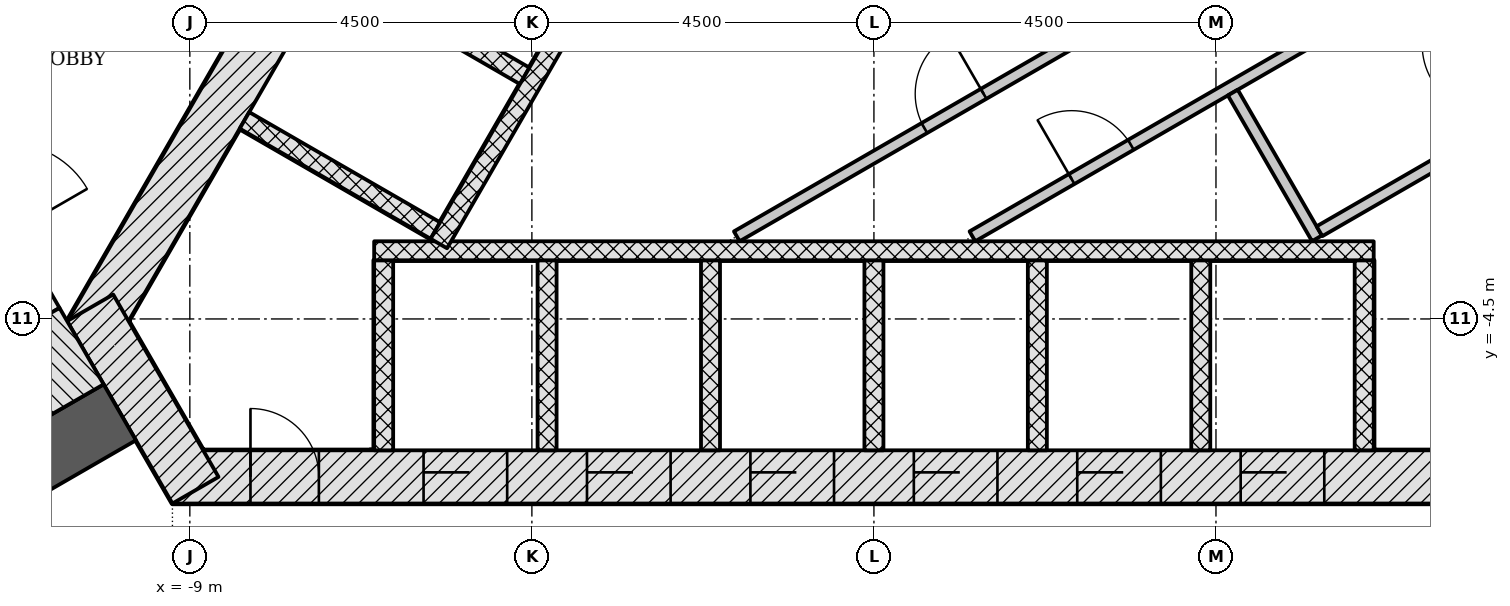
"""IFC4 building model, lengths in metres.
Left out: names, types, materials, properties, quantities, classifications, styles, units other than length and angle.
Written with IfcOpenShell. Run it as: python <this file> out.ifc"""

import sys

from ifc_helpers import new_model, si_unit, direction, frame, frame_2d, origin, place, context, subcontext, project, spatial, rectangle, extrude, element, fill, save


model = new_model("IFC4")
c1 = context("Model", 3, precision=1e-05, world=origin(), true_north=direction((0.0, 1.0)))
c2 = subcontext(c1, "Body", "Model", "MODEL_VIEW")
j1 = project(units=[si_unit("LENGTHUNIT", "METRE"), si_unit("PLANEANGLEUNIT", "RADIAN")], contexts=[c1])
p1 = place(None, origin())
s1 = spatial("IfcSite", under=j1, at=p1, CompositionType="ELEMENT")
p2 = place(p1, origin())
s2 = spatial("IfcBuilding", under=s1, at=p2, CompositionType="ELEMENT")
p3 = place(p2, frame((0.0, 0.0, 79.8)))
s3 = spatial("IfcBuildingStorey", under=s2, at=p3, CompositionType="ELEMENT", Elevation=79.8)
p4 = place(p3, frame((-9.229, -6.578, -0.2), z_axis=(0.0, 0.0, 1.0), x_axis=(1.0, 0.0, 0.0)))
e1 = element("IfcWall", 1, at=p4, inside=s3, PredefinedType="SHEAR", context=c2, shape_type="SweptSolid", body=[
    extrude(rectangle(XDim=18.458, YDim=0.7, at=frame_2d((9.229, 0.0))), origin(), (0.0, 0.0, 1.0), 3.6),
])
p5 = place(p4, frame((3.304, 0.0, 0.2)))
e2 = element("IfcOpeningElement", 2, at=p5, cuts=e1, PredefinedType="OPENING", context=c2, shape_type="SweptSolid", body=[
    extrude(rectangle(XDim=1.1, YDim=2.1, at=frame_2d((0.55, 1.05))), frame((0.0, 0.36, 0.0), z_axis=(0.0, -1.0, 0.0), x_axis=(1.0, 0.0, 0.0)), (0.0, 0.0, 1.0), 0.72),
])
p6 = place(p4, frame((5.454, 0.0, 0.2)))
e3 = element("IfcOpeningElement", 3, at=p6, cuts=e1, PredefinedType="OPENING", context=c2, shape_type="SweptSolid", body=[
    extrude(rectangle(XDim=1.1, YDim=2.1, at=frame_2d((0.55, 1.05))), frame((0.0, 0.36, 0.0), z_axis=(0.0, -1.0, 0.0), x_axis=(1.0, 0.0, 0.0)), (0.0, 0.0, 1.0), 0.72),
])
p7 = place(p4, frame((7.604, 0.0, 0.2)))
e4 = element("IfcOpeningElement", 4, at=p7, cuts=e1, PredefinedType="OPENING", context=c2, shape_type="SweptSolid", body=[
    extrude(rectangle(XDim=1.1, YDim=2.1, at=frame_2d((0.55, 1.05))), frame((0.0, 0.36, 0.0), z_axis=(0.0, -1.0, 0.0), x_axis=(1.0, 0.0, 0.0)), (0.0, 0.0, 1.0), 0.72),
])
p8 = place(p4, frame((9.754, 0.0, 0.2)))
e5 = element("IfcOpeningElement", 5, at=p8, cuts=e1, PredefinedType="OPENING", context=c2, shape_type="SweptSolid", body=[
    extrude(rectangle(XDim=1.1, YDim=2.1, at=frame_2d((0.55, 1.05))), frame((0.0, 0.36, 0.0), z_axis=(0.0, -1.0, 0.0), x_axis=(1.0, 0.0, 0.0)), (0.0, 0.0, 1.0), 0.72),
])
p9 = place(p4, frame((11.904, 0.0, 0.2)))
e6 = element("IfcOpeningElement", 6, at=p9, cuts=e1, PredefinedType="OPENING", context=c2, shape_type="SweptSolid", body=[
    extrude(rectangle(XDim=1.1, YDim=2.1, at=frame_2d((0.55, 1.05))), frame((0.0, 0.36, 0.0), z_axis=(0.0, -1.0, 0.0), x_axis=(1.0, 0.0, 0.0)), (0.0, 0.0, 1.0), 0.72),
])
p10 = place(p4, frame((14.054, 0.0, 0.2)))
e7 = element("IfcOpeningElement", 7, at=p10, cuts=e1, PredefinedType="OPENING", context=c2, shape_type="SweptSolid", body=[
    extrude(rectangle(XDim=1.1, YDim=2.1, at=frame_2d((0.55, 1.05))), frame((0.0, 0.36, 0.0), z_axis=(0.0, -1.0, 0.0), x_axis=(1.0, 0.0, 0.0)), (0.0, 0.0, 1.0), 0.72),
])
p11 = place(p4, frame((1.026, 0.0, 0.2)))
e8 = element("IfcOpeningElement", 8, at=p11, cuts=e1, PredefinedType="OPENING", context=c2, shape_type="SweptSolid", body=[
    extrude(rectangle(XDim=0.9, YDim=2.1, at=frame_2d((0.45, 1.05))), frame((0.0, 0.36, 0.0), z_axis=(0.0, -1.0, 0.0), x_axis=(1.0, 0.0, 0.0)), (0.0, 0.0, 1.0), 0.72),
])
p12 = place(p3, frame((10.311, -4.703, -0.2), z_axis=(0.0, 0.0, 1.0), x_axis=(-0.500001446645, 0.866024568562, 0.0)))
e9 = element("IfcWall", 9, at=p12, inside=s3, PredefinedType="SHEAR", context=c2, shape_type="SweptSolid", body=[
    extrude(rectangle(XDim=18.458, YDim=0.7, at=frame_2d((9.229, 0.0))), origin(), (0.0, 0.0, 1.0), 3.6),
])
p13 = place(p12, frame((5.9, 0.0, 0.2)))
e10 = element("IfcOpeningElement", 10, at=p13, cuts=e9, PredefinedType="OPENING", context=c2, shape_type="SweptSolid", body=[
    extrude(rectangle(XDim=1.0, YDim=2.1, at=frame_2d((0.5, 1.05))), frame((0.0, 0.36, 0.0), z_axis=(0.0, -1.0, 0.0), x_axis=(1.0, 0.0, 0.0)), (0.0, 0.0, 1.0), 0.72),
])
p14 = place(p12, frame((1.452, 0.0, 0.2)))
e11 = element("IfcOpeningElement", 11, at=p14, cuts=e9, PredefinedType="OPENING", context=c2, shape_type="SweptSolid", body=[
    extrude(rectangle(XDim=0.9, YDim=2.1, at=frame_2d((0.45, 1.05))), frame((0.0, 0.36, 0.0), z_axis=(0.0, -1.0, 0.0), x_axis=(1.0, 0.0, 0.0)), (0.0, 0.0, 1.0), 0.72),
])
p15 = place(p12, frame((4.396, 0.0, 0.2)))
e12 = element("IfcOpeningElement", 12, at=p15, cuts=e9, PredefinedType="OPENING", context=c2, shape_type="SweptSolid", body=[
    extrude(rectangle(XDim=0.9, YDim=2.1, at=frame_2d((0.45, 1.05))), frame((0.0, 0.36, 0.0), z_axis=(0.0, -1.0, 0.0), x_axis=(1.0, 0.0, 0.0)), (0.0, 0.0, 1.0), 0.72),
])
p16 = place(p12, frame((13.023, 0.0, 0.2)))
e13 = element("IfcOpeningElement", 13, at=p16, cuts=e9, PredefinedType="OPENING", context=c2, shape_type="SweptSolid", body=[
    extrude(rectangle(XDim=0.9, YDim=2.1, at=frame_2d((0.45, 1.05))), frame((0.0, 0.36, 0.0), z_axis=(0.0, -1.0, 0.0), x_axis=(1.0, 0.0, 0.0)), (0.0, 0.0, 1.0), 0.72),
])
p17 = place(p3, frame((-1.083, 11.281, -0.2), z_axis=(0.0, 0.0, 1.0), x_axis=(-0.500001446645, -0.866024568562, 0.0)))
e14 = element("IfcWall", 14, at=p17, inside=s3, PredefinedType="SHEAR", context=c2, shape_type="SweptSolid", body=[
    extrude(rectangle(XDim=18.458, YDim=0.7, at=frame_2d((9.229, 0.0))), origin(), (0.0, 0.0, 1.0), 3.6),
])
p18 = place(p17, frame((8.979, 0.0, 0.2)))
e15 = element("IfcOpeningElement", 15, at=p18, cuts=e14, PredefinedType="OPENING", context=c2, shape_type="SweptSolid", body=[
    extrude(rectangle(XDim=1.2, YDim=2.1, at=frame_2d((0.6, 1.05))), frame((0.0, 0.36, 0.0), z_axis=(0.0, -1.0, 0.0), x_axis=(1.0, 0.0, 0.0)), (0.0, 0.0, 1.0), 0.72),
])
p19 = place(p17, frame((11.029, 0.0, 0.2)))
e16 = element("IfcOpeningElement", 16, at=p19, cuts=e14, PredefinedType="OPENING", context=c2, shape_type="SweptSolid", body=[
    extrude(rectangle(XDim=1.2, YDim=2.1, at=frame_2d((0.6, 1.05))), frame((0.0, 0.36, 0.0), z_axis=(0.0, -1.0, 0.0), x_axis=(1.0, 0.0, 0.0)), (0.0, 0.0, 1.0), 0.72),
])
p20 = place(p3, frame((-10.311, -4.353, -0.2), z_axis=(0.0, 0.0, 1.0), x_axis=(0.500042739161, -0.866000726912, 0.0)))
e17 = element("IfcWall", 17, at=p20, inside=s3, PredefinedType="SHEAR", context=c2, shape_type="SweptSolid", body=[
    extrude(rectangle(XDim=2.771, YDim=0.7, at=frame_2d((1.386, 0.0))), origin(), (0.0, 0.0, 1.0), 3.6),
])
p21 = place(p3, frame((-9.922, -5.728, -0.2), z_axis=(0.0, 0.0, 1.0), x_axis=(-0.866026565165, -0.499997988424, 0.0)))
e18 = element("IfcWall", 18, at=p21, inside=s3, PredefinedType="SHEAR", context=c2, shape_type="SweptSolid", body=[
    extrude(rectangle(XDim=13.064, YDim=0.85, at=frame_2d((6.532, 0.0))), origin(), (0.0, 0.0, 1.0), 3.6),
])
for number, where, z_axis, x_axis in (
    (19, (-6.45, -6.228, -0.2), (0.0, 0.0, 1.0), (0.0, 1.0, 0.0)),
    (20, (-4.3, -6.228, -0.2), (0.0, 0.0, 1.0), (0.0, 1.0, 0.0)),
    (21, (-2.15, -6.228, -0.2), (0.0, 0.0, 1.0), (0.0, 1.0, 0.0)),
    (22, (0.0, -6.228, -0.2), (0.0, 0.0, 1.0), (0.0, 1.0, 0.0)),
    (23, (2.15, -6.228, -0.2), (0.0, 0.0, 1.0), (0.0, 1.0, 0.0)),
    (24, (4.3, -6.228, -0.2), (0.0, 0.0, 1.0), (0.0, 1.0, 0.0)),
    (25, (6.45, -6.228, -0.2), (0.0, 0.0, 1.0), (0.0, 1.0, 0.0)),
):
    element("IfcWall", number, at=place(p3, frame(where, z_axis=z_axis, x_axis=x_axis)), inside=s3, PredefinedType="PARTITIONING", context=c2, shape_type="SweptSolid", body=[
        extrude(rectangle(XDim=2.5, YDim=0.25, at=frame_2d((1.25, 0.0))), origin(), (0.0, 0.0, 1.0), 3.6),
    ])
p22 = place(p3, frame((-6.575, -3.603, 0.0), z_axis=(0.0, 0.0, 1.0), x_axis=(1.0, 0.0, 0.0)))
e26 = element("IfcWall", 26, at=p22, inside=s3, PredefinedType="PARTITIONING", context=c2, shape_type="SweptSolid", body=[
    extrude(rectangle(XDim=13.15, YDim=0.25, at=frame_2d((6.575, 0.0))), origin(), (0.0, 0.0, 1.0), 3.4),
])
for number, where, z_axis, x_axis in (
    (27, (-7.106, 0.148, -0.2), (0.0, 0.0, 1.0), (0.866, -0.5, 0.0)),
    (28, (-8.281, -1.887, -0.2), (0.0, 0.0, 1.0), (0.866, -0.5, 0.0)),
):
    element("IfcWall", number, at=place(p3, frame(where, z_axis=z_axis, x_axis=x_axis)), inside=s3, PredefinedType="PARTITIONING", context=c2, shape_type="SweptSolid", body=[
        extrude(rectangle(XDim=2.9, YDim=0.25, at=frame_2d((1.45, 0.0))), origin(), (0.0, 0.0, 1.0), 3.6),
    ])
p23 = place(p3, frame((0.176, 6.711, 0.0), z_axis=(0.0, 0.0, 1.0), x_axis=(-0.500004227369, -0.866022963098, 0.0)))
e29 = element("IfcWall", 29, at=p23, inside=s3, PredefinedType="PARTITIONING", context=c2, shape_type="SweptSolid", body=[
    extrude(rectangle(XDim=11.8, YDim=0.25, at=frame_2d((5.9, 0.0))), origin(), (0.0, 0.0, 1.0), 3.4),
])
p24 = place(p3, frame((-1.804, -3.413, 0.0), z_axis=(0.0, 0.0, 1.0), x_axis=(0.866035761792, 0.499982058975, 0.0)))
e30 = element("IfcWall", 30, at=p24, inside=s3, PredefinedType="PARTITIONING", context=c2, shape_type="SweptSolid", body=[
    extrude(rectangle(XDim=9.497, YDim=0.15, at=frame_2d((4.749, 0.0))), origin(), (0.0, 0.0, 1.0), 3.4),
])
p25 = place(p24, frame((2.85, 0.0, 0.0)))
e31 = element("IfcOpeningElement", 31, at=p25, cuts=e30, PredefinedType="OPENING", context=c2, shape_type="SweptSolid", body=[
    extrude(rectangle(XDim=0.9, YDim=2.1, at=frame_2d((0.45, 1.05))), frame((0.0, 0.085, 0.0), z_axis=(0.0, -1.0, 0.0), x_axis=(1.0, 0.0, 0.0)), (0.0, 0.0, 1.0), 0.17),
])
p26 = place(p3, frame((1.296, -3.413, 0.0), z_axis=(0.0, 0.0, 1.0), x_axis=(0.866029230515, 0.49999337185, 0.0)))
e32 = element("IfcWall", 32, at=p26, inside=s3, PredefinedType="PARTITIONING", context=c2, shape_type="SweptSolid", body=[
    extrude(rectangle(XDim=6.812, YDim=0.15, at=frame_2d((3.406, 0.0))), origin(), (0.0, 0.0, 1.0), 3.4),
])
p27 = place(p26, frame((1.507, 0.0, 0.0)))
e33 = element("IfcOpeningElement", 33, at=p27, cuts=e32, PredefinedType="OPENING", context=c2, shape_type="SweptSolid", body=[
    extrude(rectangle(XDim=0.9, YDim=2.1, at=frame_2d((0.45, 1.05))), frame((0.0, 0.085, 0.0), z_axis=(0.0, -1.0, 0.0), x_axis=(1.0, 0.0, 0.0)), (0.0, 0.0, 1.0), 0.17),
])
p28 = place(p3, frame((5.829, -3.439, 0.0), z_axis=(0.0, 0.0, 1.0), x_axis=(-0.49995790319, 0.866049707025, 0.0)))
e34 = element("IfcWall", 34, at=p28, inside=s3, PredefinedType="PARTITIONING", context=c2, shape_type="SweptSolid", body=[
    extrude(rectangle(XDim=2.214, YDim=0.15, at=frame_2d((1.107, 0.0))), origin(), (0.0, 0.0, 1.0), 3.4),
])
p29 = place(p3, frame((5.862, -3.346, 0.0), z_axis=(0.0, 0.0, 1.0), x_axis=(0.866011447264, 0.500024172624, 0.0)))
e35 = element("IfcWall", 35, at=p29, inside=s3, PredefinedType="PARTITIONING", context=c2, shape_type="SweptSolid", body=[
    extrude(rectangle(XDim=2.825, YDim=0.15, at=frame_2d((1.413, 0.0))), origin(), (0.0, 0.0, 1.0), 3.4),
])
p30 = place(p3, frame((-12.576, -1.331, -0.2), z_axis=(0.0, 0.0, 1.0), x_axis=(0.499970499736, -0.8660424351, 0.0)))
e36 = element("IfcWall", 36, at=p30, inside=s3, PredefinedType="SHEAR", context=c2, shape_type="SweptSolid", body=[
    extrude(rectangle(XDim=3.55, YDim=0.2, at=frame_2d((1.775, 0.0))), origin(), (0.0, 0.0, 1.0), 3.6),
])
p31 = place(p30, frame((1.175, 0.0, 0.2)))
e37 = element("IfcOpeningElement", 37, at=p31, cuts=e36, PredefinedType="OPENING", context=c2, shape_type="SweptSolid", body=[
    extrude(rectangle(XDim=1.2, YDim=2.1, at=frame_2d((0.6, 1.05))), frame((0.0, 0.11, 0.0), z_axis=(0.0, -1.0, 0.0), x_axis=(1.0, 0.0, 0.0)), (0.0, 0.0, 1.0), 0.22),
])
p32 = place(p3, frame((-10.424, -4.858, -0.2), z_axis=(0.0, 0.0, 1.0), x_axis=(-0.866033125095, -0.499986626058, 0.0)))
e38 = element("IfcWall", 38, at=p32, inside=s3, PredefinedType="SHEAR", context=c2, shape_type="SweptSolid", body=[
    extrude(rectangle(XDim=7.2, YDim=1.161, at=frame_2d((3.6, 0.0))), origin(), (0.0, 0.0, 1.0), 3.6),
])
p33 = place(p3, frame((-16.256, -3.149, 0.0), z_axis=(0.0, 0.0, 1.0), x_axis=(0.499999683919, 0.866025586274, 0.0)))
e39 = element("IfcWall", 39, at=p33, inside=s3, PredefinedType="PARTITIONING", context=c2, shape_type="SweptSolid", body=[
    extrude(rectangle(XDim=22.234, YDim=0.15, at=frame_2d((11.117, 0.0))), origin(), (0.0, 0.0, 1.0), 2.778),
])
p34 = place(p33, frame((13.553, 0.0, 0.0)))
e40 = element("IfcOpeningElement", 40, at=p34, cuts=e39, PredefinedType="OPENING", context=c2, shape_type="SweptSolid", body=[
    extrude(rectangle(XDim=1.0, YDim=2.1, at=frame_2d((0.5, 1.05))), frame((0.0, 0.085, 0.0), z_axis=(0.0, -1.0, 0.0), x_axis=(1.0, 0.0, 0.0)), (0.0, 0.0, 1.0), 0.17),
])
p35 = place(p33, frame((11.56, 0.0, 0.0)))
e41 = element("IfcOpeningElement", 41, at=p35, cuts=e39, PredefinedType="OPENING", context=c2, shape_type="SweptSolid", body=[
    extrude(rectangle(XDim=1.0, YDim=2.1, at=frame_2d((0.5, 1.05))), frame((0.0, 0.085, 0.0), z_axis=(0.0, -1.0, 0.0), x_axis=(1.0, 0.0, 0.0)), (0.0, 0.0, 1.0), 0.17),
])
p36 = place(p33, frame((3.446, 0.0, 0.0)))
e42 = element("IfcOpeningElement", 42, at=p36, cuts=e39, PredefinedType="OPENING", context=c2, shape_type="SweptSolid", body=[
    extrude(rectangle(XDim=1.5, YDim=2.1, at=frame_2d((0.75, 1.05))), frame((0.0, 0.085, 0.0), z_axis=(0.0, -1.0, 0.0), x_axis=(1.0, 0.0, 0.0)), (0.0, 0.0, 1.0), 0.17),
])
p37 = place(p3, frame((-4.407, 13.374, 0.0), z_axis=(0.0, 0.0, 1.0), x_axis=(-0.499997181693, -0.866027030928, 0.0)))
e43 = element("IfcWall", 43, at=p37, inside=s3, PredefinedType="PARTITIONING", context=c2, shape_type="SweptSolid", body=[
    extrude(rectangle(XDim=16.77, YDim=0.15, at=frame_2d((8.385, 0.0))), origin(), (0.0, 0.0, 1.0), 2.778),
])
p38 = place(p37, frame((8.879, 0.0, 0.0)))
e44 = element("IfcOpeningElement", 44, at=p38, cuts=e43, PredefinedType="OPENING", context=c2, shape_type="SweptSolid", body=[
    extrude(rectangle(XDim=1.0, YDim=2.1, at=frame_2d((0.5, 1.05))), frame((0.0, 0.085, 0.0), z_axis=(0.0, -1.0, 0.0), x_axis=(1.0, 0.0, 0.0)), (0.0, 0.0, 1.0), 0.17),
])
p39 = place(p3, frame((5.346, 8.446, 0.0), z_axis=(0.0, 0.0, 1.0), x_axis=(0.500008781656, -0.866020333634, 0.0)))
e45 = element("IfcWall", 45, at=p39, inside=s3, PredefinedType="PARTITIONING", context=c2, shape_type="SweptSolid", body=[
    extrude(rectangle(XDim=15.057, YDim=0.15, at=frame_2d((7.528, 0.0))), origin(), (0.0, 0.0, 1.0), 2.778),
])
p40 = place(p39, frame((12.552, 0.0, 0.0)))
e46 = element("IfcOpeningElement", 46, at=p40, cuts=e45, PredefinedType="OPENING", context=c2, shape_type="SweptSolid", body=[
    extrude(rectangle(XDim=1.0, YDim=2.1, at=frame_2d((0.5, 1.05))), frame((0.0, 0.085, 0.0), z_axis=(0.0, -1.0, 0.0), x_axis=(1.0, 0.0, 0.0)), (0.0, 0.0, 1.0), 0.17),
])
p41 = place(p39, frame((9.365, 0.0, 0.0)))
e47 = element("IfcOpeningElement", 47, at=p41, cuts=e45, PredefinedType="OPENING", context=c2, shape_type="SweptSolid", body=[
    extrude(rectangle(XDim=1.0, YDim=2.1, at=frame_2d((0.5, 1.05))), frame((0.0, 0.085, 0.0), z_axis=(0.0, -1.0, 0.0), x_axis=(1.0, 0.0, 0.0)), (0.0, 0.0, 1.0), 0.17),
])
p42 = place(p39, frame((6.816, 0.0, 0.0)))
e48 = element("IfcOpeningElement", 48, at=p42, cuts=e45, PredefinedType="OPENING", context=c2, shape_type="SweptSolid", body=[
    extrude(rectangle(XDim=1.0, YDim=2.1, at=frame_2d((0.5, 1.05))), frame((0.0, 0.085, 0.0), z_axis=(0.0, -1.0, 0.0), x_axis=(1.0, 0.0, 0.0)), (0.0, 0.0, 1.0), 0.17),
])
p43 = place(p39, frame((3.509, 0.0, 0.0)))
e49 = element("IfcOpeningElement", 49, at=p43, cuts=e45, PredefinedType="OPENING", context=c2, shape_type="SweptSolid", body=[
    extrude(rectangle(XDim=1.5, YDim=2.1, at=frame_2d((0.75, 1.05))), frame((0.0, 0.085, 0.0), z_axis=(0.0, -1.0, 0.0), x_axis=(1.0, 0.0, 0.0)), (0.0, 0.0, 1.0), 0.17),
])
p44 = place(p3, frame((-11.376, -7.059, 0.0), z_axis=(0.0, 0.0, 1.0), x_axis=(0.500076779081, -0.865981070823, 0.0)))
e50 = element("IfcWall", 50, at=p44, inside=s3, PredefinedType="PARTITIONING", context=c2, shape_type="SweptSolid", body=[
    extrude(rectangle(XDim=2.147, YDim=0.15, at=frame_2d((1.074, 0.0))), origin(), (0.0, 0.0, 1.0), 2.778),
])
p45 = place(p5, origin())
e51 = element("IfcDoor", 51, at=p45, inside=s3, OperationType="DOUBLE_DOOR_SLIDING", PredefinedType="DOOR", context=c2, shape_type="SweptSolid", body=[
    extrude(rectangle(XDim=1.1, YDim=2.1, at=frame_2d((0.55, 1.05))), frame((0.0, 0.025, 0.0), z_axis=(0.0, -1.0, 0.0), x_axis=(1.0, 0.0, 0.0)), (0.0, 0.0, 1.0), 0.05),
])
fill(e2, e51)
p46 = place(p6, origin())
e52 = element("IfcDoor", 52, at=p46, inside=s3, OperationType="DOUBLE_DOOR_SLIDING", PredefinedType="DOOR", context=c2, shape_type="SweptSolid", body=[
    extrude(rectangle(XDim=1.1, YDim=2.1, at=frame_2d((0.55, 1.05))), frame((0.0, 0.025, 0.0), z_axis=(0.0, -1.0, 0.0), x_axis=(1.0, 0.0, 0.0)), (0.0, 0.0, 1.0), 0.05),
])
fill(e3, e52)
p47 = place(p7, origin())
e53 = element("IfcDoor", 53, at=p47, inside=s3, OperationType="DOUBLE_DOOR_SLIDING", PredefinedType="DOOR", context=c2, shape_type="SweptSolid", body=[
    extrude(rectangle(XDim=1.1, YDim=2.1, at=frame_2d((0.55, 1.05))), frame((0.0, 0.025, 0.0), z_axis=(0.0, -1.0, 0.0), x_axis=(1.0, 0.0, 0.0)), (0.0, 0.0, 1.0), 0.05),
])
fill(e4, e53)
p48 = place(p8, origin())
e54 = element("IfcDoor", 54, at=p48, inside=s3, OperationType="DOUBLE_DOOR_SLIDING", PredefinedType="DOOR", context=c2, shape_type="SweptSolid", body=[
    extrude(rectangle(XDim=1.1, YDim=2.1, at=frame_2d((0.55, 1.05))), frame((0.0, 0.025, 0.0), z_axis=(0.0, -1.0, 0.0), x_axis=(1.0, 0.0, 0.0)), (0.0, 0.0, 1.0), 0.05),
])
fill(e5, e54)
p49 = place(p9, origin())
e55 = element("IfcDoor", 55, at=p49, inside=s3, OperationType="DOUBLE_DOOR_SLIDING", PredefinedType="DOOR", context=c2, shape_type="SweptSolid", body=[
    extrude(rectangle(XDim=1.1, YDim=2.1, at=frame_2d((0.55, 1.05))), frame((0.0, 0.025, 0.0), z_axis=(0.0, -1.0, 0.0), x_axis=(1.0, 0.0, 0.0)), (0.0, 0.0, 1.0), 0.05),
])
fill(e6, e55)
p50 = place(p10, origin())
e56 = element("IfcDoor", 56, at=p50, inside=s3, OperationType="DOUBLE_DOOR_SLIDING", PredefinedType="DOOR", context=c2, shape_type="SweptSolid", body=[
    extrude(rectangle(XDim=1.1, YDim=2.1, at=frame_2d((0.55, 1.05))), frame((0.0, 0.025, 0.0), z_axis=(0.0, -1.0, 0.0), x_axis=(1.0, 0.0, 0.0)), (0.0, 0.0, 1.0), 0.05),
])
fill(e7, e56)
p51 = place(p27, origin())
e57 = element("IfcDoor", 57, at=p51, inside=s3, OperationType="SINGLE_SWING_LEFT", PredefinedType="DOOR", context=c2, shape_type="SweptSolid", body=[
    extrude(rectangle(XDim=0.9, YDim=2.1, at=frame_2d((0.45, 1.05))), frame((0.0, 0.025, 0.0), z_axis=(0.0, -1.0, 0.0), x_axis=(1.0, 0.0, 0.0)), (0.0, 0.0, 1.0), 0.05),
])
fill(e33, e57)
p52 = place(p25, origin())
e58 = element("IfcDoor", 58, at=p52, inside=s3, OperationType="SINGLE_SWING_RIGHT", PredefinedType="DOOR", context=c2, shape_type="SweptSolid", body=[
    extrude(rectangle(XDim=0.9, YDim=2.1, at=frame_2d((0.45, 1.05))), frame((0.0, 0.025, 0.0), z_axis=(0.0, -1.0, 0.0), x_axis=(1.0, 0.0, 0.0)), (0.0, 0.0, 1.0), 0.05),
])
fill(e31, e58)
p53 = place(p11, origin())
e59 = element("IfcDoor", 59, at=p53, inside=s3, OperationType="SINGLE_SWING_LEFT", PredefinedType="DOOR", context=c2, shape_type="SweptSolid", body=[
    extrude(rectangle(XDim=0.9, YDim=2.1, at=frame_2d((0.45, 1.05))), frame((0.0, 0.075, 0.0), z_axis=(0.0, -1.0, 0.0), x_axis=(1.0, 0.0, 0.0)), (0.0, 0.0, 1.0), 0.15),
])
fill(e8, e59)
save(model, sys.argv[1])
